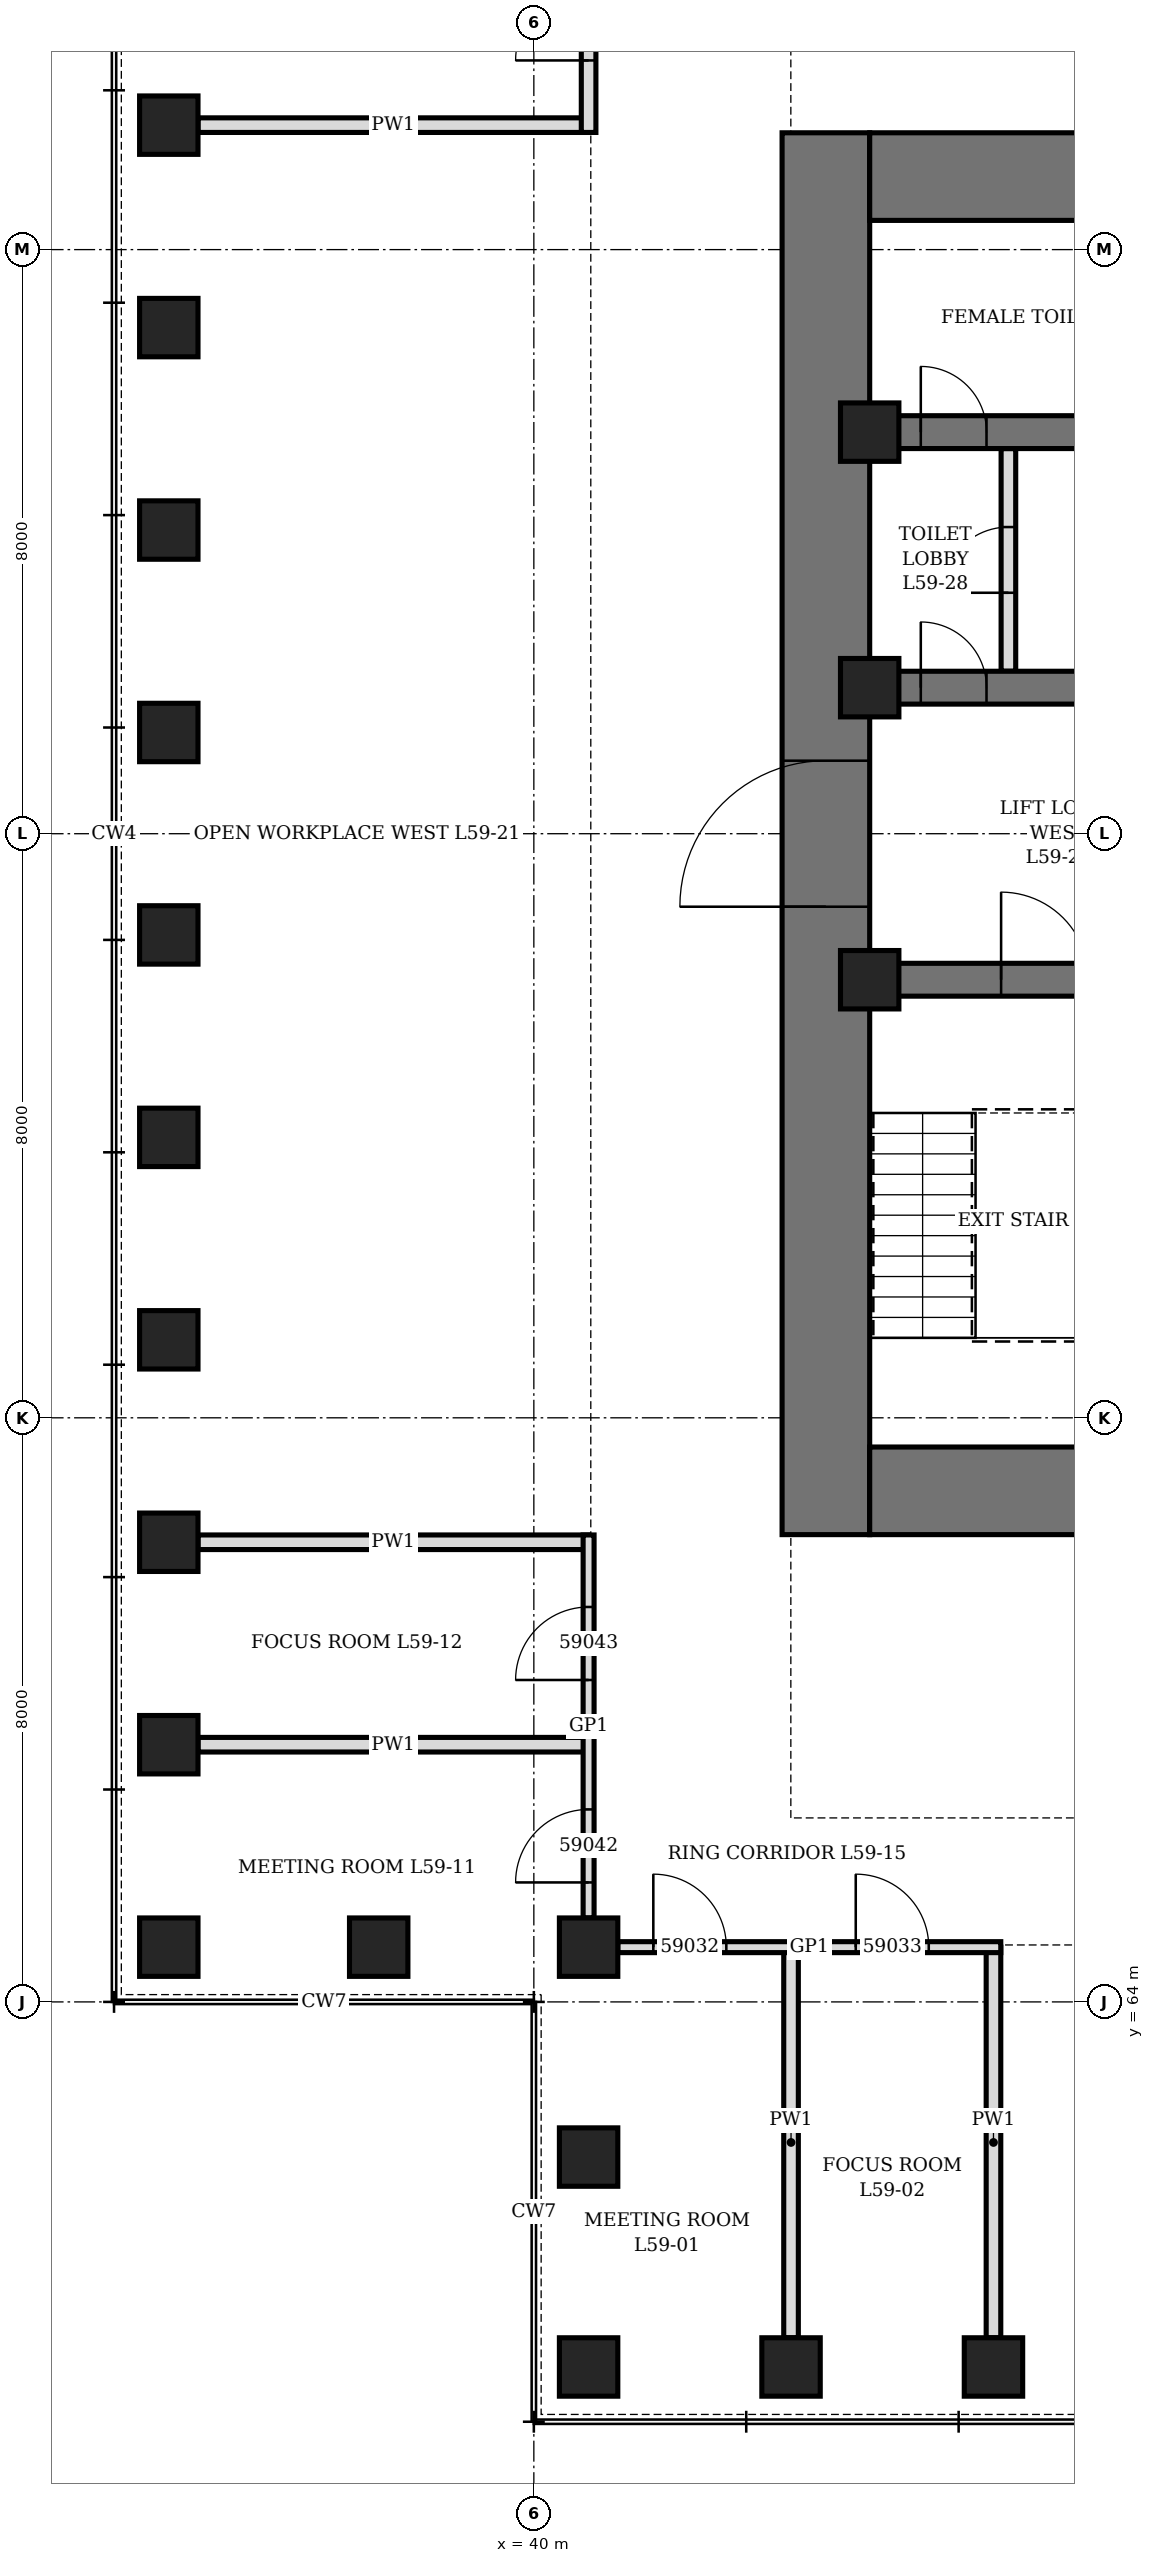
"""IFC4 building model, lengths in metres.
Left out: names, types, materials, properties, quantities, classifications, styles, units other than length and angle.
Written with IfcOpenShell. Run it as: python <this file> out.ifc"""

import sys

from ifc_helpers import new_model, si_unit, direction, frame, frame_2d, origin, origin_2d, place, context, subcontext, project, spatial, rectangle, hollow_rectangle, extrude, element, fill, save


model = new_model("IFC4")
c1 = context("Model", 3, precision=1e-05, world=origin(), true_north=direction((0.0, 1.0)))
c2 = subcontext(c1, "Body", "Model", "MODEL_VIEW")
j1 = project(units=[si_unit("LENGTHUNIT", "METRE"), si_unit("PLANEANGLEUNIT", "RADIAN")], contexts=[c1])
p1 = place(None, origin())
s1 = spatial("IfcSite", under=j1, at=p1, CompositionType="ELEMENT")
p2 = place(p1, origin())
s2 = spatial("IfcBuilding", under=s1, at=p2, CompositionType="ELEMENT")
p3 = place(p2, frame((0.0, 0.0, 262.9)))
s3 = spatial("IfcBuildingStorey", under=s2, at=p3, CompositionType="ELEMENT", Elevation=262.9)
for number, where, z_axis, x_axis in (
    (1, (40.75, 59.0, 0.0), (0.0, 0.0, 1.0), (1.0, 0.0, 0.0)),
    (2, (43.523, 59.0, 0.0), (0.0, 0.0, 1.0), (1.0, 0.0, 0.0)),
    (3, (46.295, 59.0, 0.0), (0.0, 0.0, 1.0), (1.0, 0.0, 0.0)),
    (4, (35.0, 89.705, 0.0), (0.0, 0.0, 1.0), (0.0, 1.0, 0.0)),
    (5, (35.0, 86.932, 0.0), (0.0, 0.0, 1.0), (0.0, 1.0, 0.0)),
    (6, (35.0, 84.159, 0.0), (0.0, 0.0, 1.0), (0.0, 1.0, 0.0)),
    (7, (35.0, 81.386, 0.0), (0.0, 0.0, 1.0), (0.0, 1.0, 0.0)),
    (8, (35.0, 78.614, 0.0), (0.0, 0.0, 1.0), (0.0, 1.0, 0.0)),
    (9, (35.0, 75.841, 0.0), (0.0, 0.0, 1.0), (0.0, 1.0, 0.0)),
    (10, (35.0, 73.068, 0.0), (0.0, 0.0, 1.0), (0.0, 1.0, 0.0)),
    (11, (35.0, 70.295, 0.0), (0.0, 0.0, 1.0), (0.0, 1.0, 0.0)),
    (12, (35.0, 67.523, 0.0), (0.0, 0.0, 1.0), (0.0, 1.0, 0.0)),
    (13, (35.0, 64.75, 0.0), (0.0, 0.0, 1.0), (1.0, 0.0, 0.0)),
    (14, (37.875, 64.75, 0.0), (0.0, 0.0, 1.0), (1.0, 0.0, 0.0)),
    (15, (40.75, 64.75, 0.0), (0.0, 0.0, 1.0), (0.0, 1.0, 0.0)),
    (16, (40.75, 61.875, 0.0), (0.0, 0.0, 1.0), (0.0, 1.0, 0.0)),
):
    element("IfcColumn", number, at=place(p3, frame(where, z_axis=z_axis, x_axis=x_axis)), inside=s3, PredefinedType="COLUMN", context=c2, shape_type="SweptSolid", body=[
        extrude(hollow_rectangle(XDim=0.8, YDim=0.8, WallThickness=0.1, at=origin_2d()), origin(), (0.0, 0.0, 1.0), 4.2),
    ])
p4 = place(p3, frame((44.0, 70.4, 0.0), z_axis=(0.0, 0.0, 1.0), x_axis=(0.0, 1.0, 0.0)))
e17 = element("IfcWall", 17, at=p4, inside=s3, PredefinedType="SHEAR", context=c2, shape_type="SweptSolid", body=[
    extrude(rectangle(XDim=19.2, YDim=1.2, at=frame_2d((9.6, 0.0))), origin(), (0.0, 0.0, 1.0), 4.2),
])
p5 = place(p4, frame((8.6, 0.0, 0.0)))
e18 = element("IfcOpeningElement", 18, at=p5, cuts=e17, PredefinedType="OPENING", context=c2, shape_type="SweptSolid", body=[
    extrude(rectangle(XDim=2.0, YDim=2.4, at=frame_2d((1.0, 1.2))), frame((0.0, 0.61, 0.0), z_axis=(0.0, -1.0, 0.0), x_axis=(1.0, 0.0, 0.0)), (0.0, 0.0, 1.0), 1.22),
])
p6 = place(p3, frame((44.6, 71.0, 0.0), z_axis=(0.0, 0.0, 1.0), x_axis=(1.0, 0.0, 0.0)))
e19 = element("IfcWall", 19, at=p6, inside=s3, PredefinedType="SHEAR", context=c2, shape_type="SweptSolid", body=[
    extrude(rectangle(XDim=22.8, YDim=1.2, at=frame_2d((11.4, 0.0))), origin(), (0.0, 0.0, 1.0), 4.2),
])
p7 = place(p6, frame((6.35, 0.0, 0.0)))
e20 = element("IfcOpeningElement", 20, at=p7, cuts=e19, PredefinedType="OPENING", context=c2, shape_type="SweptSolid", body=[
    extrude(rectangle(XDim=1.1, YDim=2.2, at=frame_2d((0.55, 1.1))), frame((0.0, 0.61, 0.0), z_axis=(0.0, -1.0, 0.0), x_axis=(1.0, 0.0, 0.0)), (0.0, 0.0, 1.0), 1.22),
])
p8 = place(p6, frame((9.35, 0.0, 0.0)))
e21 = element("IfcOpeningElement", 21, at=p8, cuts=e19, PredefinedType="OPENING", context=c2, shape_type="SweptSolid", body=[
    extrude(rectangle(XDim=1.1, YDim=2.2, at=frame_2d((0.55, 1.1))), frame((0.0, 0.61, 0.0), z_axis=(0.0, -1.0, 0.0), x_axis=(1.0, 0.0, 0.0)), (0.0, 0.0, 1.0), 1.22),
])
p9 = place(p6, frame((12.35, 0.0, 0.0)))
e22 = element("IfcOpeningElement", 22, at=p9, cuts=e19, PredefinedType="OPENING", context=c2, shape_type="SweptSolid", body=[
    extrude(rectangle(XDim=1.1, YDim=2.2, at=frame_2d((0.55, 1.1))), frame((0.0, 0.61, 0.0), z_axis=(0.0, -1.0, 0.0), x_axis=(1.0, 0.0, 0.0)), (0.0, 0.0, 1.0), 1.22),
])
p10 = place(p6, frame((15.35, 0.0, 0.0)))
e23 = element("IfcOpeningElement", 23, at=p10, cuts=e19, PredefinedType="OPENING", context=c2, shape_type="SweptSolid", body=[
    extrude(rectangle(XDim=1.1, YDim=2.2, at=frame_2d((0.55, 1.1))), frame((0.0, 0.61, 0.0), z_axis=(0.0, -1.0, 0.0), x_axis=(1.0, 0.0, 0.0)), (0.0, 0.0, 1.0), 1.22),
])
p11 = place(p3, frame((44.6, 89.0, 0.0), z_axis=(0.0, 0.0, 1.0), x_axis=(1.0, 0.0, 0.0)))
e24 = element("IfcWall", 24, at=p11, inside=s3, PredefinedType="SHEAR", context=c2, shape_type="SweptSolid", body=[
    extrude(rectangle(XDim=22.8, YDim=1.2, at=frame_2d((11.4, 0.0))), origin(), (0.0, 0.0, 1.0), 4.2),
])
p12 = place(p11, frame((6.325, 0.0, 0.0)))
e25 = element("IfcOpeningElement", 25, at=p12, cuts=e24, PredefinedType="OPENING", context=c2, shape_type="SweptSolid", body=[
    extrude(rectangle(XDim=1.0, YDim=2.1, at=frame_2d((0.5, 1.05))), frame((0.0, 0.61, 0.0), z_axis=(0.0, -1.0, 0.0), x_axis=(1.0, 0.0, 0.0)), (0.0, 0.0, 1.0), 1.22),
])
p13 = place(p11, frame((9.25, 0.0, 0.0)))
e26 = element("IfcOpeningElement", 26, at=p13, cuts=e24, PredefinedType="OPENING", context=c2, shape_type="SweptSolid", body=[
    extrude(rectangle(XDim=0.9, YDim=2.1, at=frame_2d((0.45, 1.05))), frame((0.0, 0.61, 0.0), z_axis=(0.0, -1.0, 0.0), x_axis=(1.0, 0.0, 0.0)), (0.0, 0.0, 1.0), 1.22),
])
p14 = place(p11, frame((13.012, 0.0, 0.0)))
e27 = element("IfcOpeningElement", 27, at=p14, cuts=e24, PredefinedType="OPENING", context=c2, shape_type="SweptSolid", body=[
    extrude(rectangle(XDim=0.9, YDim=2.1, at=frame_2d((0.45, 1.05))), frame((0.0, 0.61, 0.0), z_axis=(0.0, -1.0, 0.0), x_axis=(1.0, 0.0, 0.0)), (0.0, 0.0, 1.0), 1.22),
])
p15 = place(p3, frame((44.6, 78.0, 0.0), z_axis=(0.0, 0.0, 1.0), x_axis=(1.0, 0.0, 0.0)))
e28 = element("IfcWall", 28, at=p15, inside=s3, PredefinedType="SHEAR", context=c2, shape_type="SweptSolid", body=[
    extrude(rectangle(XDim=5.175, YDim=0.45, at=frame_2d((2.587, 0.0))), origin(), (0.0, 0.0, 1.0), 4.2),
])
p16 = place(p15, frame((1.8, 0.0, 0.0)))
e29 = element("IfcOpeningElement", 29, at=p16, cuts=e28, PredefinedType="OPENING", context=c2, shape_type="SweptSolid", body=[
    extrude(rectangle(XDim=1.2, YDim=2.1, at=frame_2d((0.6, 1.05))), frame((0.0, 0.235, 0.0), z_axis=(0.0, -1.0, 0.0), x_axis=(1.0, 0.0, 0.0)), (0.0, 0.0, 1.0), 0.47),
])
p17 = place(p3, frame((44.6, 82.0, 0.0), z_axis=(0.0, 0.0, 1.0), x_axis=(1.0, 0.0, 0.0)))
e30 = element("IfcWall", 30, at=p17, inside=s3, PredefinedType="SHEAR", context=c2, shape_type="SweptSolid", body=[
    extrude(rectangle(XDim=5.175, YDim=0.45, at=frame_2d((2.587, 0.0))), origin(), (0.0, 0.0, 1.0), 4.2),
])
p18 = place(p17, frame((0.7, 0.0, 0.0)))
e31 = element("IfcOpeningElement", 31, at=p18, cuts=e30, PredefinedType="OPENING", context=c2, shape_type="SweptSolid", body=[
    extrude(rectangle(XDim=0.9, YDim=2.1, at=frame_2d((0.45, 1.05))), frame((0.0, 0.235, 0.0), z_axis=(0.0, -1.0, 0.0), x_axis=(1.0, 0.0, 0.0)), (0.0, 0.0, 1.0), 0.47),
])
p19 = place(p3, frame((44.6, 85.5, 0.0), z_axis=(0.0, 0.0, 1.0), x_axis=(1.0, 0.0, 0.0)))
e32 = element("IfcWall", 32, at=p19, inside=s3, PredefinedType="SHEAR", context=c2, shape_type="SweptSolid", body=[
    extrude(rectangle(XDim=5.175, YDim=0.45, at=frame_2d((2.587, 0.0))), origin(), (0.0, 0.0, 1.0), 4.2),
])
p20 = place(p19, frame((0.7, 0.0, 0.0)))
e33 = element("IfcOpeningElement", 33, at=p20, cuts=e32, PredefinedType="OPENING", context=c2, shape_type="SweptSolid", body=[
    extrude(rectangle(XDim=0.9, YDim=2.1, at=frame_2d((0.45, 1.05))), frame((0.0, 0.235, 0.0), z_axis=(0.0, -1.0, 0.0), x_axis=(1.0, 0.0, 0.0)), (0.0, 0.0, 1.0), 0.47),
])
for number, where, z_axis, x_axis in (
    (34, (44.6, 78.0, 0.0), (0.0, 0.0, 1.0), (1.0, 0.0, 0.0)),
    (35, (44.6, 82.0, 0.0), (0.0, 0.0, 1.0), (1.0, 0.0, 0.0)),
    (36, (44.6, 85.5, 0.0), (0.0, 0.0, 1.0), (1.0, 0.0, 0.0)),
):
    element("IfcColumn", number, at=place(p3, frame(where, z_axis=z_axis, x_axis=x_axis)), inside=s3, PredefinedType="COLUMN", context=c2, shape_type="SweptSolid", body=[
        extrude(hollow_rectangle(XDim=0.8, YDim=0.8, WallThickness=0.1, at=origin_2d()), origin(), (0.0, 0.0, 1.0), 4.2),
    ])
p21 = place(p3, frame((46.5, 82.225, 0.0), z_axis=(0.0, 0.0, 1.0), x_axis=(0.0, 1.0, 0.0)))
e37 = element("IfcWall", 37, at=p21, inside=s3, PredefinedType="PARTITIONING", context=c2, shape_type="SweptSolid", body=[
    extrude(rectangle(XDim=3.05, YDim=0.2, at=frame_2d((1.525, 0.0))), origin(), (0.0, 0.0, 1.0), 4.04),
])
p22 = place(p21, frame((1.075, 0.0, 0.0)))
e38 = element("IfcOpeningElement", 38, at=p22, cuts=e37, PredefinedType="OPENING", context=c2, shape_type="SweptSolid", body=[
    extrude(rectangle(XDim=0.9, YDim=2.1, at=frame_2d((0.45, 1.05))), frame((0.0, 0.11, 0.0), z_axis=(0.0, -1.0, 0.0), x_axis=(1.0, 0.0, 0.0)), (0.0, 0.0, 1.0), 0.22),
])
for number, where, z_axis, x_axis in (
    (39, (43.523, 59.4, 0.0), (0.0, 0.0, 1.0), (0.0, 1.0, 0.0)),
    (40, (46.295, 59.4, 0.0), (0.0, 0.0, 1.0), (0.0, 1.0, 0.0)),
    (41, (35.4, 67.523, 0.0), (0.0, 0.0, 1.0), (1.0, 0.0, 0.0)),
    (42, (35.4, 70.295, 0.0), (0.0, 0.0, 1.0), (1.0, 0.0, 0.0)),
    (43, (35.4, 89.705, 0.0), (0.0, 0.0, 1.0), (1.0, 0.0, 0.0)),
):
    element("IfcWall", number, at=place(p3, frame(where, z_axis=z_axis, x_axis=x_axis)), inside=s3, PredefinedType="PARTITIONING", context=c2, shape_type="SweptSolid", body=[
        extrude(rectangle(XDim=5.35, YDim=0.2, at=frame_2d((2.675, 0.0))), origin(), (0.0, 0.0, 1.0), 3.428),
    ])
p23 = place(p3, frame((41.15, 64.75, 0.0), z_axis=(0.0, 0.0, 1.0), x_axis=(1.0, 0.0, 0.0)))
e44 = element("IfcWall", 44, at=p23, inside=s3, PredefinedType="PARTITIONING", context=c2, shape_type="SweptSolid", body=[
    extrude(rectangle(XDim=5.246, YDim=0.15, at=frame_2d((2.623, 0.0))), origin(), (0.0, 0.0, 1.0), 4.04),
])
p24 = place(p23, frame((0.486, 0.0, 0.0)))
e45 = element("IfcOpeningElement", 45, at=p24, cuts=e44, PredefinedType="OPENING", context=c2, shape_type="SweptSolid", body=[
    extrude(rectangle(XDim=1.0, YDim=2.4, at=frame_2d((0.5, 1.2))), frame((0.0, 0.085, 0.0), z_axis=(0.0, -1.0, 0.0), x_axis=(1.0, 0.0, 0.0)), (0.0, 0.0, 1.0), 0.17),
])
p25 = place(p23, frame((3.259, 0.0, 0.0)))
e46 = element("IfcOpeningElement", 46, at=p25, cuts=e44, PredefinedType="OPENING", context=c2, shape_type="SweptSolid", body=[
    extrude(rectangle(XDim=1.0, YDim=2.4, at=frame_2d((0.5, 1.2))), frame((0.0, 0.085, 0.0), z_axis=(0.0, -1.0, 0.0), x_axis=(1.0, 0.0, 0.0)), (0.0, 0.0, 1.0), 0.17),
])
p26 = place(p3, frame((40.75, 65.15, 0.0), z_axis=(0.0, 0.0, 1.0), x_axis=(0.0, 1.0, 0.0)))
e47 = element("IfcWall", 47, at=p26, inside=s3, PredefinedType="PARTITIONING", context=c2, shape_type="SweptSolid", body=[
    extrude(rectangle(XDim=5.246, YDim=0.15, at=frame_2d((2.623, 0.0))), origin(), (0.0, 0.0, 1.0), 4.04),
])
p27 = place(p26, frame((0.486, 0.0, 0.0)))
e48 = element("IfcOpeningElement", 48, at=p27, cuts=e47, PredefinedType="OPENING", context=c2, shape_type="SweptSolid", body=[
    extrude(rectangle(XDim=1.0, YDim=2.4, at=frame_2d((0.5, 1.2))), frame((0.0, 0.085, 0.0), z_axis=(0.0, -1.0, 0.0), x_axis=(1.0, 0.0, 0.0)), (0.0, 0.0, 1.0), 0.17),
])
p28 = place(p26, frame((3.259, 0.0, 0.0)))
e49 = element("IfcOpeningElement", 49, at=p28, cuts=e47, PredefinedType="OPENING", context=c2, shape_type="SweptSolid", body=[
    extrude(rectangle(XDim=1.0, YDim=2.4, at=frame_2d((0.5, 1.2))), frame((0.0, 0.085, 0.0), z_axis=(0.0, -1.0, 0.0), x_axis=(1.0, 0.0, 0.0)), (0.0, 0.0, 1.0), 0.17),
])
p29 = place(p3, frame((40.75, 89.604, 0.0), z_axis=(0.0, 0.0, 1.0), x_axis=(0.0, 1.0, 0.0)))
e50 = element("IfcWall", 50, at=p29, inside=s3, PredefinedType="PARTITIONING", context=c2, shape_type="SweptSolid", body=[
    extrude(rectangle(XDim=2.873, YDim=0.2, at=frame_2d((1.437, 0.0))), origin(), (0.0, 0.0, 1.0), 4.04),
])
p30 = place(p29, frame((0.986, 0.0, 0.0)))
e51 = element("IfcOpeningElement", 51, at=p30, cuts=e50, PredefinedType="OPENING", context=c2, shape_type="SweptSolid", body=[
    extrude(rectangle(XDim=1.0, YDim=2.1, at=frame_2d((0.5, 1.05))), frame((0.0, 0.11, 0.0), z_axis=(0.0, -1.0, 0.0), x_axis=(1.0, 0.0, 0.0)), (0.0, 0.0, 1.0), 0.22),
])
p31 = place(p18, origin())
e52 = element("IfcDoor", 52, at=p31, inside=s3, OperationType="SINGLE_SWING_LEFT", PredefinedType="DOOR", context=c2, shape_type="SweptSolid", body=[
    extrude(rectangle(XDim=0.9, YDim=2.1, at=frame_2d((0.45, 1.05))), frame((0.0, 0.225, 0.0), z_axis=(0.0, -1.0, 0.0), x_axis=(1.0, 0.0, 0.0)), (0.0, 0.0, 1.0), 0.449),
])
fill(e31, e52)
p32 = place(p22, origin())
e53 = element("IfcDoor", 53, at=p32, inside=s3, OperationType="SINGLE_SWING_RIGHT", PredefinedType="DOOR", context=c2, shape_type="SweptSolid", body=[
    extrude(rectangle(XDim=0.9, YDim=2.1, at=frame_2d((0.45, 1.05))), frame((0.0, 0.1, 0.0), z_axis=(0.0, -1.0, 0.0), x_axis=(1.0, 0.0, 0.0)), (0.0, 0.0, 1.0), 0.199),
])
fill(e38, e53)
p33 = place(p20, origin())
e54 = element("IfcDoor", 54, at=p33, inside=s3, OperationType="SINGLE_SWING_RIGHT", PredefinedType="DOOR", context=c2, shape_type="SweptSolid", body=[
    extrude(rectangle(XDim=0.9, YDim=2.1, at=frame_2d((0.45, 1.05))), frame((0.0, 0.225, 0.0), z_axis=(0.0, -1.0, 0.0), x_axis=(1.0, 0.0, 0.0)), (0.0, 0.0, 1.0), 0.449),
])
fill(e33, e54)
p34 = place(p16, origin())
e55 = element("IfcDoor", 55, at=p34, inside=s3, OperationType="SINGLE_SWING_LEFT", PredefinedType="DOOR", context=c2, shape_type="SweptSolid", body=[
    extrude(rectangle(XDim=1.2, YDim=2.1, at=frame_2d((0.6, 1.05))), frame((0.0, 0.225, 0.0), z_axis=(0.0, -1.0, 0.0), x_axis=(1.0, 0.0, 0.0)), (0.0, 0.0, 1.0), 0.449),
])
fill(e29, e55)
p35 = place(p5, origin())
e56 = element("IfcDoor", 56, at=p35, inside=s3, OperationType="DOUBLE_DOOR_SINGLE_SWING", PredefinedType="DOOR", context=c2, shape_type="SweptSolid", body=[
    extrude(rectangle(XDim=2.0, YDim=2.4, at=frame_2d((1.0, 1.2))), frame((0.0, 0.35, 0.0), z_axis=(0.0, -1.0, 0.0), x_axis=(1.0, 0.0, 0.0)), (0.0, 0.0, 1.0), 0.7),
])
fill(e18, e56)
p36 = place(p24, origin())
e57 = element("IfcDoor", 57, at=p36, inside=s3, OperationType="SINGLE_SWING_RIGHT", PredefinedType="DOOR", context=c2, shape_type="SweptSolid", body=[
    extrude(rectangle(XDim=1.0, YDim=2.4, at=frame_2d((0.5, 1.2))), frame((0.0, 0.075, 0.0), z_axis=(0.0, -1.0, 0.0), x_axis=(1.0, 0.0, 0.0)), (0.0, 0.0, 1.0), 0.149),
])
fill(e45, e57)
p37 = place(p25, origin())
e58 = element("IfcDoor", 58, at=p37, inside=s3, OperationType="SINGLE_SWING_RIGHT", PredefinedType="DOOR", context=c2, shape_type="SweptSolid", body=[
    extrude(rectangle(XDim=1.0, YDim=2.4, at=frame_2d((0.5, 1.2))), frame((0.0, 0.075, 0.0), z_axis=(0.0, -1.0, 0.0), x_axis=(1.0, 0.0, 0.0)), (0.0, 0.0, 1.0), 0.149),
])
fill(e46, e58)
p38 = place(p27, origin())
e59 = element("IfcDoor", 59, at=p38, inside=s3, OperationType="SINGLE_SWING_RIGHT", PredefinedType="DOOR", context=c2, shape_type="SweptSolid", body=[
    extrude(rectangle(XDim=1.0, YDim=2.4, at=frame_2d((0.5, 1.2))), frame((0.0, 0.075, 0.0), z_axis=(0.0, -1.0, 0.0), x_axis=(1.0, 0.0, 0.0)), (0.0, 0.0, 1.0), 0.149),
])
fill(e48, e59)
p39 = place(p28, origin())
e60 = element("IfcDoor", 60, at=p39, inside=s3, OperationType="SINGLE_SWING_RIGHT", PredefinedType="DOOR", context=c2, shape_type="SweptSolid", body=[
    extrude(rectangle(XDim=1.0, YDim=2.4, at=frame_2d((0.5, 1.2))), frame((0.0, 0.075, 0.0), z_axis=(0.0, -1.0, 0.0), x_axis=(1.0, 0.0, 0.0)), (0.0, 0.0, 1.0), 0.149),
])
fill(e49, e60)
p40 = place(p30, origin())
e61 = element("IfcDoor", 61, at=p40, inside=s3, OperationType="SINGLE_SWING_LEFT", PredefinedType="DOOR", context=c2, shape_type="SweptSolid", body=[
    extrude(rectangle(XDim=1.0, YDim=2.1, at=frame_2d((0.5, 1.05))), frame((0.0, 0.1, 0.0), z_axis=(0.0, -1.0, 0.0), x_axis=(1.0, 0.0, 0.0)), (0.0, 0.0, 1.0), 0.199),
])
fill(e51, e61)
save(model, sys.argv[1])
